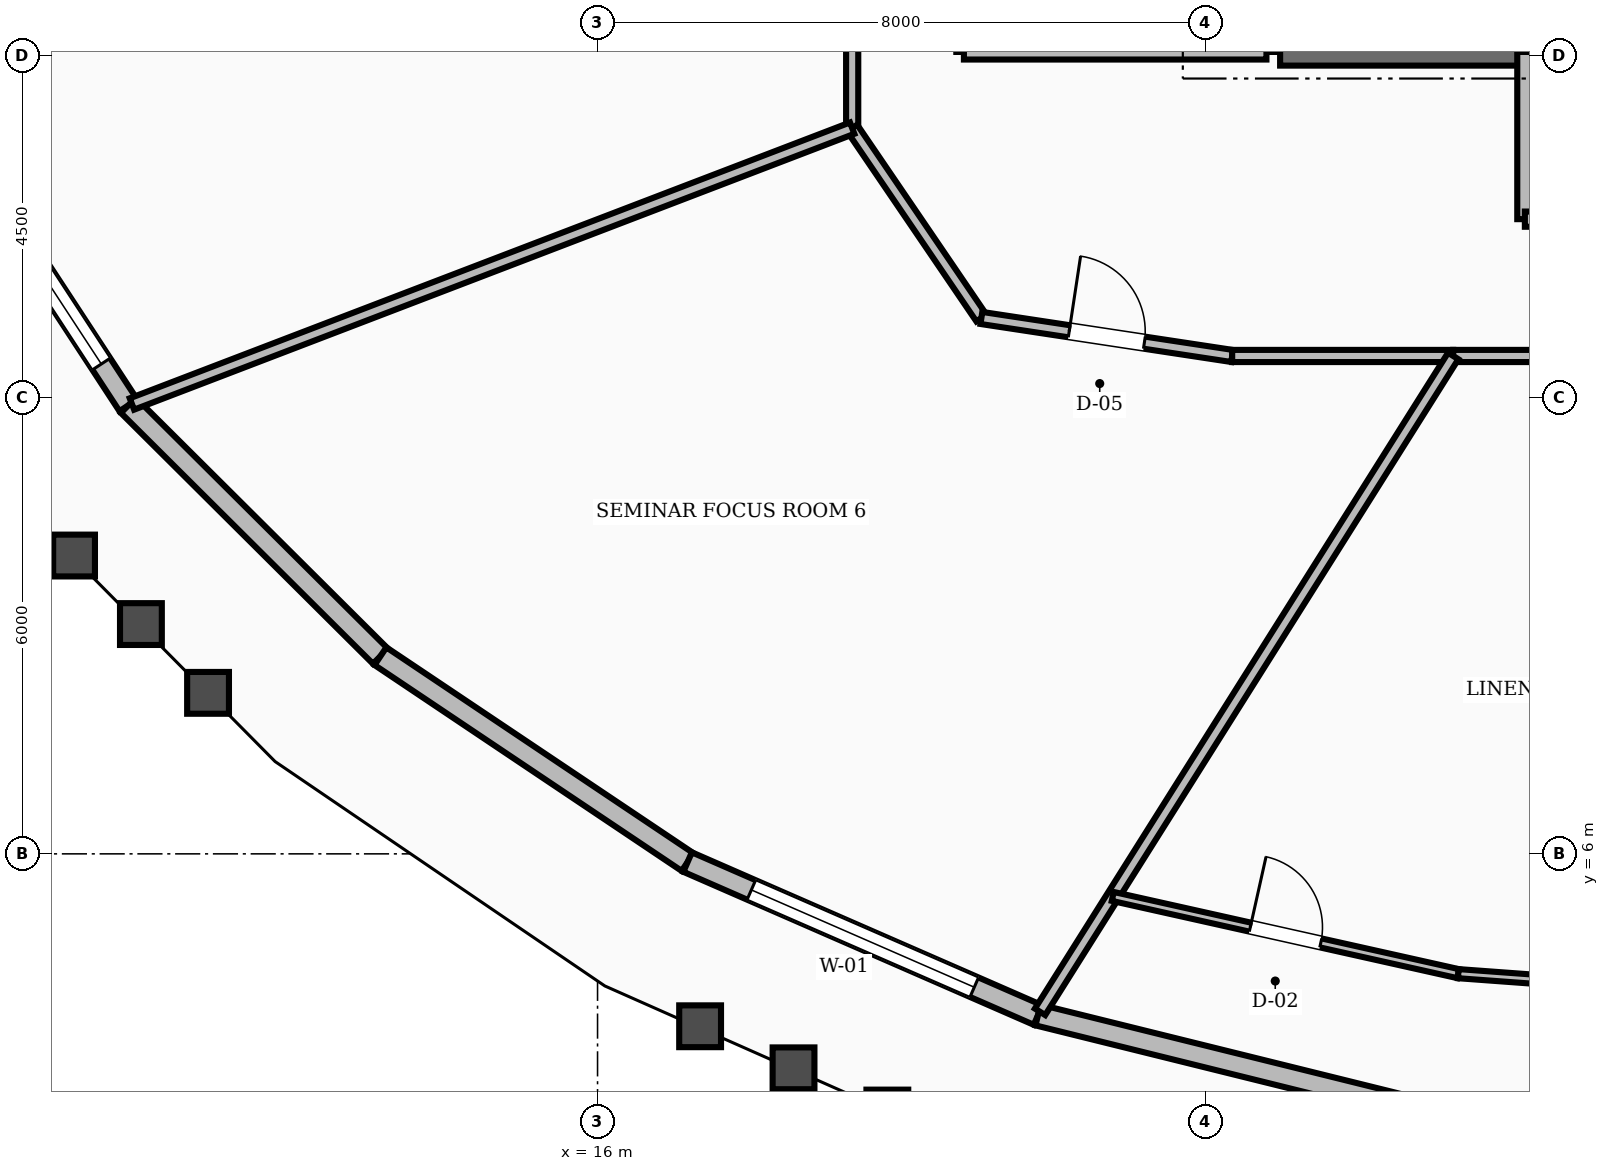
"""IFC4 building model, lengths in metres.
Left out: names, types, materials, properties, quantities, classifications, styles, units other than length and angle.
Written with IfcOpenShell. Run it as: python <this file> out.ifc"""

import sys

from ifc_helpers import new_model, si_unit, direction, frame, frame_2d, origin, place, context, subcontext, project, spatial, rectangle, extrude, element, fill, save


model = new_model("IFC4")
c1 = context("Model", 3, precision=1e-05, world=origin(), true_north=direction((0.0, 1.0)))
c2 = subcontext(c1, "Body", "Model", "MODEL_VIEW")
j1 = project(units=[si_unit("LENGTHUNIT", "METRE"), si_unit("PLANEANGLEUNIT", "RADIAN")], contexts=[c1])
p1 = place(None, origin())
s1 = spatial("IfcSite", under=j1, at=p1, CompositionType="ELEMENT")
p2 = place(p1, origin())
s2 = spatial("IfcBuilding", under=s1, at=p2, CompositionType="ELEMENT")
p3 = place(p2, frame((0.0, 0.0, 124.4)))
s3 = spatial("IfcBuildingStorey", under=s2, at=p3, CompositionType="ELEMENT", Elevation=124.4)
p4 = place(p3, frame((24.98, 16.55, 0.0), z_axis=(0.0, 0.0, 1.0), x_axis=(1.0, 0.0, 0.0)))
e1 = element("IfcWall", 1, at=p4, inside=s3, PredefinedType="SHEAR", context=c2, shape_type="SweptSolid", body=[
    extrude(rectangle(XDim=3.22, YDim=0.36, at=frame_2d((1.61, 0.0))), origin(), (0.0, 0.0, 1.0), 3.6),
])
p5 = place(p3, frame((7.363, 15.666, 0.0), z_axis=(0.0, 0.0, 1.0), x_axis=(0.547581138096, -0.836752590197, 0.0)))
e2 = element("IfcWall", 2, at=p5, inside=s3, PredefinedType="STANDARD", context=c2, shape_type="SweptSolid", body=[
    extrude(rectangle(XDim=4.5, YDim=0.28, at=frame_2d((2.25, 0.0))), origin(), (0.0, 0.0, 1.0), 2.82),
])
p6 = place(p5, frame((0.65, 0.0, 0.8)))
e3 = element("IfcOpeningElement", 3, at=p6, cuts=e2, PredefinedType="OPENING", context=c2, shape_type="SweptSolid", body=[
    extrude(rectangle(XDim=3.2, YDim=1.65, at=frame_2d((1.6, 0.825))), frame((0.0, 0.15, 0.0), z_axis=(0.0, -1.0, 0.0), x_axis=(1.0, 0.0, 0.0)), (0.0, 0.0, 1.0), 0.3),
])
p7 = place(p3, frame((9.827, 11.9, 0.0), z_axis=(0.0, 0.0, 1.0), x_axis=(0.708826657364, -0.70538271159, 0.0)))
e4 = element("IfcWall", 4, at=p7, inside=s3, PredefinedType="STANDARD", context=c2, shape_type="SweptSolid", body=[
    extrude(rectangle(XDim=4.679, YDim=0.28, at=frame_2d((2.339, 0.0))), origin(), (0.0, 0.0, 1.0), 2.82),
])
p8 = place(p3, frame((13.144, 8.6, 0.0), z_axis=(0.0, 0.0, 1.0), x_axis=(0.83069663506, -0.556725336679, 0.0)))
e5 = element("IfcWall", 5, at=p8, inside=s3, PredefinedType="STANDARD", context=c2, shape_type="SweptSolid", body=[
    extrude(rectangle(XDim=4.865, YDim=0.28, at=frame_2d((2.432, 0.0))), origin(), (0.0, 0.0, 1.0), 2.82),
])
p9 = place(p3, frame((17.185, 5.892, 0.0), z_axis=(0.0, 0.0, 1.0), x_axis=(0.916473381058, -0.400095665825, 0.0)))
e6 = element("IfcWall", 6, at=p9, inside=s3, PredefinedType="STANDARD", context=c2, shape_type="SweptSolid", body=[
    extrude(rectangle(XDim=5.031, YDim=0.28, at=frame_2d((2.515, 0.0))), origin(), (0.0, 0.0, 1.0), 2.82),
])
p10 = place(p9, frame((0.915, 0.0, 0.8)))
e7 = element("IfcOpeningElement", 7, at=p10, cuts=e6, PredefinedType="OPENING", context=c2, shape_type="SweptSolid", body=[
    extrude(rectangle(XDim=3.2, YDim=1.65, at=frame_2d((1.6, 0.825))), frame((0.0, 0.15, 0.0), z_axis=(0.0, -1.0, 0.0), x_axis=(1.0, 0.0, 0.0)), (0.0, 0.0, 1.0), 0.3),
])
p11 = place(p3, frame((21.795, 3.879, 0.0), z_axis=(0.0, 0.0, 1.0), x_axis=(0.970658593631, -0.24046183608, 0.0)))
e8 = element("IfcWall", 8, at=p11, inside=s3, PredefinedType="STANDARD", context=c2, shape_type="SweptSolid", body=[
    extrude(rectangle(XDim=5.154, YDim=0.28, at=frame_2d((2.577, 0.0))), origin(), (0.0, 0.0, 1.0), 2.82),
])
p12 = place(p3, frame((20.82, 16.55, 0.0), z_axis=(0.0, 0.0, 1.0), x_axis=(1.0, 0.0, 0.0)))
e9 = element("IfcWall", 9, at=p12, inside=s3, PredefinedType="SOLIDWALL", context=c2, shape_type="SweptSolid", body=[
    extrude(rectangle(XDim=3.98, YDim=0.2, at=frame_2d((1.99, 0.0))), origin(), (0.0, 0.0, 1.0), 2.8),
])
p13 = place(p3, frame((28.2, 14.35, 0.0), z_axis=(0.0, 0.0, 1.0), x_axis=(0.0, 1.0, 0.0)))
e10 = element("IfcWall", 10, at=p13, inside=s3, PredefinedType="SOLIDWALL", context=c2, shape_type="SweptSolid", body=[
    extrude(rectangle(XDim=2.2, YDim=0.2, at=frame_2d((1.1, 0.0))), origin(), (0.0, 0.0, 1.0), 2.8),
])
p14 = place(p3, frame((28.2, 14.35, 0.0), z_axis=(0.0, 0.0, 1.0), x_axis=(1.0, 0.0, 0.0)))
e11 = element("IfcWall", 11, at=p14, inside=s3, PredefinedType="SOLIDWALL", context=c2, shape_type="SweptSolid", body=[
    extrude(rectangle(XDim=7.6, YDim=0.2, at=frame_2d((3.8, 0.0))), origin(), (0.0, 0.0, 1.0), 2.8),
])
p15 = place(p14, frame((3.2, 0.0, 0.0)))
e12 = element("IfcOpeningElement", 12, at=p15, cuts=e11, PredefinedType="OPENING", context=c2, shape_type="SweptSolid", body=[
    extrude(rectangle(XDim=1.2, YDim=2.1, at=frame_2d((0.6, 1.05))), frame((0.0, 0.11, 0.0), z_axis=(0.0, -1.0, 0.0), x_axis=(1.0, 0.0, 0.0)), (0.0, 0.0, 1.0), 0.22),
])
p16 = place(p3, frame((19.35, 18.76, 0.0), z_axis=(0.0, 0.0, 1.0), x_axis=(0.0, -1.0, 0.0)))
e13 = element("IfcWall", 13, at=p16, inside=s3, PredefinedType="SOLIDWALL", context=c2, shape_type="SweptSolid", body=[
    extrude(rectangle(XDim=3.213, YDim=0.16, at=frame_2d((1.606, 0.0))), origin(), (0.0, 0.0, 1.0), 2.8),
])
p17 = place(p3, frame((19.35, 15.548, 0.0), z_axis=(0.0, 0.0, 1.0), x_axis=(0.562674669208, -0.826678423955, 0.0)))
e14 = element("IfcWall", 14, at=p17, inside=s3, PredefinedType="SOLIDWALL", context=c2, shape_type="SweptSolid", body=[
    extrude(rectangle(XDim=3.021, YDim=0.16, at=frame_2d((1.511, 0.0))), origin(), (0.0, 0.0, 1.0), 2.8),
])
p18 = place(p3, frame((21.05, 13.05, 0.0), z_axis=(0.0, 0.0, 1.0), x_axis=(0.988710906508, -0.149835721217, 0.0)))
e15 = element("IfcWall", 15, at=p18, inside=s3, PredefinedType="SOLIDWALL", context=c2, shape_type="SweptSolid", body=[
    extrude(rectangle(XDim=3.337, YDim=0.16, at=frame_2d((1.668, 0.0))), origin(), (0.0, 0.0, 1.0), 2.8),
])
p19 = place(p18, frame((1.168, 0.0, 0.0)))
e16 = element("IfcOpeningElement", 16, at=p19, cuts=e15, PredefinedType="OPENING", context=c2, shape_type="SweptSolid", body=[
    extrude(rectangle(XDim=1.0, YDim=2.1, at=frame_2d((0.5, 1.05))), frame((0.0, 0.09, 0.0), z_axis=(0.0, -1.0, 0.0), x_axis=(1.0, 0.0, 0.0)), (0.0, 0.0, 1.0), 0.18),
])
p20 = place(p3, frame((24.349, 12.55, 0.0), z_axis=(0.0, 0.0, 1.0), x_axis=(1.0, 0.0, 0.0)))
e17 = element("IfcWall", 17, at=p20, inside=s3, PredefinedType="SOLIDWALL", context=c2, shape_type="SweptSolid", body=[
    extrude(rectangle(XDim=2.908, YDim=0.16, at=frame_2d((1.454, 0.0))), origin(), (0.0, 0.0, 1.0), 2.8),
])
p21 = place(p3, frame((27.257, 12.55, 0.0), z_axis=(0.0, 0.0, 1.0), x_axis=(1.0, 0.0, 0.0)))
e18 = element("IfcWall", 18, at=p21, inside=s3, PredefinedType="SOLIDWALL", context=c2, shape_type="SweptSolid", body=[
    extrude(rectangle(XDim=2.465, YDim=0.16, at=frame_2d((1.232, 0.0))), origin(), (0.0, 0.0, 1.0), 2.8),
])
p22 = place(p3, frame((19.35, 15.548, 0.0), z_axis=(0.0, 0.0, 1.0), x_axis=(-0.933853161124, -0.35765664185, 0.0)))
e19 = element("IfcWall", 19, at=p22, inside=s3, PredefinedType="SOLIDWALL", context=c2, shape_type="SweptSolid", body=[
    extrude(rectangle(XDim=10.147, YDim=0.16, at=frame_2d((5.073, 0.0))), origin(), (0.0, 0.0, 1.0), 2.8),
])
p23 = place(p3, frame((27.257, 12.55, 0.0), z_axis=(0.0, 0.0, 1.0), x_axis=(-0.533001837462, -0.846114082888, 0.0)))
e20 = element("IfcWall", 20, at=p23, inside=s3, PredefinedType="SOLIDWALL", context=c2, shape_type="SweptSolid", body=[
    extrude(rectangle(XDim=10.198, YDim=0.16, at=frame_2d((5.099, 0.0))), origin(), (0.0, 0.0, 1.0), 2.8),
])
p24 = place(p3, frame((22.778, 5.44, 0.0), z_axis=(0.0, 0.0, 1.0), x_axis=(0.975906307098, -0.218190008402, 0.0)))
e21 = element("IfcWall", 21, at=p24, inside=s3, PredefinedType="PARTITIONING", context=c2, shape_type="SweptSolid", body=[
    extrude(rectangle(XDim=4.658, YDim=0.12, at=frame_2d((2.329, 0.0))), origin(), (0.0, 0.0, 1.0), 2.8),
])
p25 = place(p24, frame((1.854, 0.0, 0.0)))
e22 = element("IfcOpeningElement", 22, at=p25, cuts=e21, PredefinedType="OPENING", context=c2, shape_type="SweptSolid", body=[
    extrude(rectangle(XDim=0.95, YDim=2.1, at=frame_2d((0.475, 1.05))), frame((0.0, 0.07, 0.0), z_axis=(0.0, -1.0, 0.0), x_axis=(1.0, 0.0, 0.0)), (0.0, 0.0, 1.0), 0.14),
])
p26 = place(p3, frame((27.324, 4.424, 0.0), z_axis=(0.0, 0.0, 1.0), x_axis=(0.997319932427, -0.073163873489, 0.0)))
e23 = element("IfcWall", 23, at=p26, inside=s3, PredefinedType="PARTITIONING", context=c2, shape_type="SweptSolid", body=[
    extrude(rectangle(XDim=4.688, YDim=0.12, at=frame_2d((2.344, 0.0))), origin(), (0.0, 0.0, 1.0), 2.8),
])
p27 = place(p6, origin())
e24 = element("IfcWindow", 24, at=p27, inside=s3, PartitioningType="SINGLE_PANEL", PredefinedType="WINDOW", context=c2, shape_type="SweptSolid", body=[
    extrude(rectangle(XDim=3.2, YDim=1.65, at=frame_2d((1.6, 0.825))), frame((0.0, 0.03, 0.0), z_axis=(0.0, -1.0, 0.0), x_axis=(1.0, 0.0, 0.0)), (0.0, 0.0, 1.0), 0.06),
])
fill(e3, e24)
p28 = place(p10, origin())
e25 = element("IfcWindow", 25, at=p28, inside=s3, PartitioningType="SINGLE_PANEL", PredefinedType="WINDOW", context=c2, shape_type="SweptSolid", body=[
    extrude(rectangle(XDim=3.2, YDim=1.65, at=frame_2d((1.6, 0.825))), frame((0.0, 0.03, 0.0), z_axis=(0.0, -1.0, 0.0), x_axis=(1.0, 0.0, 0.0)), (0.0, 0.0, 1.0), 0.06),
])
fill(e7, e25)
p29 = place(p19, origin())
e26 = element("IfcDoor", 26, at=p29, inside=s3, OperationType="SINGLE_SWING_LEFT", PredefinedType="DOOR", context=c2, shape_type="SweptSolid", body=[
    extrude(rectangle(XDim=1.0, YDim=2.1, at=frame_2d((0.5, 1.05))), frame((0.0, 0.025, 0.0), z_axis=(0.0, -1.0, 0.0), x_axis=(1.0, 0.0, 0.0)), (0.0, 0.0, 1.0), 0.05),
])
fill(e16, e26)
p30 = place(p25, origin())
e27 = element("IfcDoor", 27, at=p30, inside=s3, OperationType="SINGLE_SWING_LEFT", PredefinedType="DOOR", context=c2, shape_type="SweptSolid", body=[
    extrude(rectangle(XDim=0.95, YDim=2.1, at=frame_2d((0.475, 1.05))), frame((0.0, 0.025, 0.0), z_axis=(0.0, -1.0, 0.0), x_axis=(1.0, 0.0, 0.0)), (0.0, 0.0, 1.0), 0.05),
])
fill(e22, e27)
save(model, sys.argv[1])
